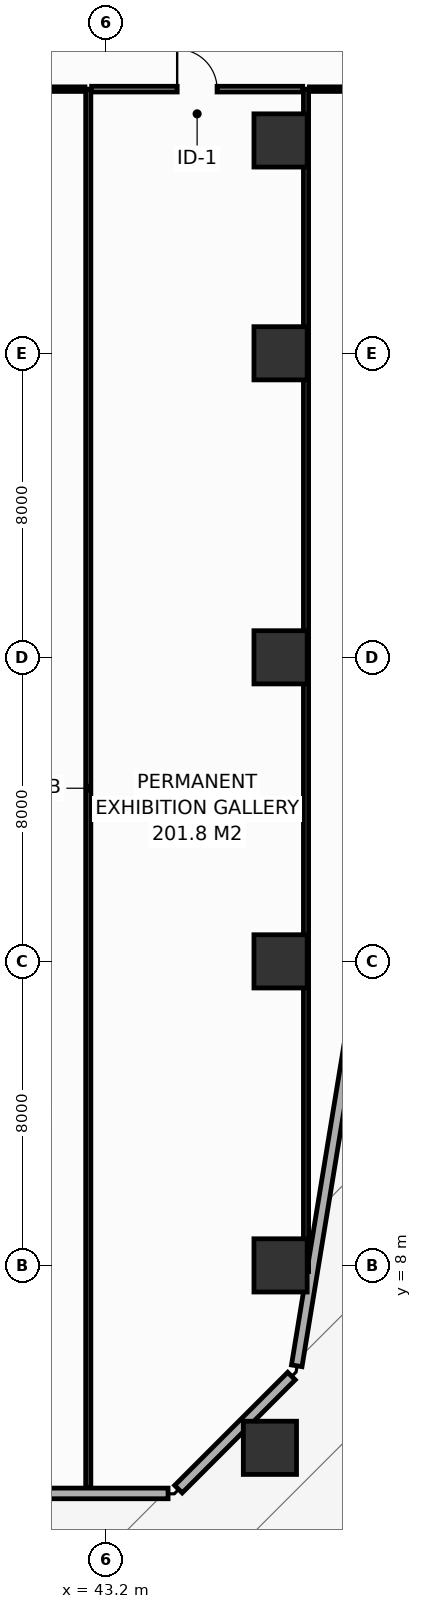
"""IFC4 building model, lengths in metres.
Left out: names, types, materials, properties, quantities, classifications, styles, units other than length and angle.
Written with IfcOpenShell. Run it as: python <this file> out.ifc"""

import sys

from ifc_helpers import new_model, si_unit, direction, frame, frame_2d, origin, origin_2d, place, context, subcontext, project, spatial, rectangle, hollow_rectangle, extrude, element, fill, save


model = new_model("IFC4")
c1 = context("Model", 3, precision=1e-05, world=origin(), true_north=direction((0.0, 1.0)))
c2 = subcontext(c1, "Body", "Model", "MODEL_VIEW")
j1 = project(units=[si_unit("LENGTHUNIT", "METRE"), si_unit("PLANEANGLEUNIT", "RADIAN")], contexts=[c1])
p1 = place(None, origin())
s1 = spatial("IfcSite", under=j1, at=p1, CompositionType="ELEMENT")
p2 = place(p1, origin())
s2 = spatial("IfcBuilding", under=s1, at=p2, CompositionType="ELEMENT")
p3 = place(p2, frame((0.0, 0.0, 27.6)))
s3 = spatial("IfcBuildingStorey", under=s2, at=p3, CompositionType="ELEMENT", Elevation=27.6)
for number, where, z_axis, x_axis in (
    (1, (47.52, 3.2, 0.0), (0.0, 0.0, 1.0), (1.0, 0.0, 0.0)),
    (2, (47.8, 8.0, 0.0), (0.0, 0.0, 1.0), (1.0, 0.0, 0.0)),
    (3, (47.8, 16.0, 0.0), (0.0, 0.0, 1.0), (1.0, 0.0, 0.0)),
    (4, (47.8, 24.0, 0.0), (0.0, 0.0, 1.0), (1.0, 0.0, 0.0)),
    (5, (47.8, 32.0, 0.0), (0.0, 0.0, 1.0), (1.0, 0.0, 0.0)),
    (6, (47.8, 37.6, 0.0), (0.0, 0.0, 1.0), (1.0, 0.0, 0.0)),
):
    element("IfcColumn", number, at=place(p3, frame(where, z_axis=z_axis, x_axis=x_axis)), inside=s3, PredefinedType="COLUMN", context=c2, shape_type="SweptSolid", body=[
        extrude(hollow_rectangle(XDim=1.4, YDim=1.4, WallThickness=0.065, at=origin_2d()), origin(), (0.0, 0.0, 1.0), 5.4),
    ])
p4 = place(p3, frame((36.56, 2.0, 0.0), z_axis=(0.0, 0.0, 1.0), x_axis=(1.0, 0.0, 0.0)))
e7 = element("IfcWall", 7, at=p4, inside=s3, PredefinedType="STANDARD", context=c2, shape_type="SweptSolid", body=[
    extrude(rectangle(XDim=8.28, YDim=0.28, at=frame_2d((4.14, 0.0))), origin(), (0.0, 0.0, 1.0), 5.15),
])
p5 = place(p4, frame((3.59, 0.0, 0.0)))
e8 = element("IfcOpeningElement", 8, at=p5, cuts=e7, PredefinedType="OPENING", context=c2, shape_type="SweptSolid", body=[
    extrude(rectangle(XDim=1.1, YDim=2.2, at=frame_2d((0.55, 1.1))), frame((0.0, 0.15, 0.0), z_axis=(0.0, -1.0, 0.0), x_axis=(1.0, 0.0, 0.0)), (0.0, 0.0, 1.0), 0.3),
])
p6 = place(p3, frame((45.113, 2.113, 0.0), z_axis=(0.0, 0.0, 1.0), x_axis=(0.707106781187, 0.707106781187, 0.0)))
e9 = element("IfcWall", 9, at=p6, inside=s3, PredefinedType="STANDARD", context=c2, shape_type="SweptSolid", body=[
    extrude(rectangle(XDim=4.206, YDim=0.28, at=frame_2d((2.103, 0.0))), origin(), (0.0, 0.0, 1.0), 5.15),
])
p7 = place(p3, frame((48.226, 5.358, 0.0), z_axis=(0.0, 0.0, 1.0), x_axis=(0.161709707857, 0.986838370953, 0.0)))
e10 = element("IfcWall", 10, at=p7, inside=s3, PredefinedType="STANDARD", context=c2, shape_type="SweptSolid", body=[
    extrude(rectangle(XDim=47.915, YDim=0.28, at=frame_2d((23.958, 0.0))), origin(), (0.0, 0.0, 1.0), 5.15),
])
p8 = place(p7, frame((23.407, 0.0, 0.0)))
e11 = element("IfcOpeningElement", 11, at=p8, cuts=e10, PredefinedType="OPENING", context=c2, shape_type="SweptSolid", body=[
    extrude(rectangle(XDim=1.1, YDim=2.2, at=frame_2d((0.55, 1.1))), frame((0.0, 0.15, 0.0), z_axis=(0.0, -1.0, 0.0), x_axis=(1.0, 0.0, 0.0)), (0.0, 0.0, 1.0), 0.3),
])
p9 = place(p3, frame((42.74, 2.16, 0.0), z_axis=(0.0, 0.0, 1.0), x_axis=(0.0, 1.0, 0.0)))
e12 = element("IfcWall", 12, at=p9, inside=s3, PredefinedType="PARTITIONING", context=c2, shape_type="SweptSolid", body=[
    extrude(rectangle(XDim=36.79, YDim=0.135, at=frame_2d((18.395, 0.0))), origin(), (0.0, 0.0, 1.0), 4.235),
])
p10 = place(p3, frame((48.47, 7.837, 0.0), z_axis=(0.0, 0.0, 1.0), x_axis=(0.0, 1.0, 0.0)))
e13 = element("IfcWall", 13, at=p10, inside=s3, PredefinedType="PARTITIONING", context=c2, shape_type="SweptSolid", body=[
    extrude(rectangle(XDim=31.113, YDim=0.135, at=frame_2d((15.557, 0.0))), origin(), (0.0, 0.0, 1.0), 4.235),
])
p11 = place(p3, frame((36.15, 38.95, 0.0), z_axis=(0.0, 0.0, 1.0), x_axis=(1.0, 0.0, 0.0)))
e14 = element("IfcWall", 14, at=p11, inside=s3, PredefinedType="PARTITIONING", context=c2, shape_type="SweptSolid", body=[
    extrude(rectangle(XDim=6.503, YDim=0.12, at=frame_2d((3.251, 0.0))), origin(), (0.0, 0.0, 1.0), 4.235),
])
p12 = place(p11, frame((2.801, 0.0, 0.0)))
e15 = element("IfcOpeningElement", 15, at=p12, cuts=e14, PredefinedType="OPENING", context=c2, shape_type="SweptSolid", body=[
    extrude(rectangle(XDim=0.9, YDim=2.1, at=frame_2d((0.45, 1.05))), frame((0.0, 0.07, 0.0), z_axis=(0.0, -1.0, 0.0), x_axis=(1.0, 0.0, 0.0)), (0.0, 0.0, 1.0), 0.14),
])
p13 = place(p3, frame((42.827, 38.95, 0.0), z_axis=(0.0, 0.0, 1.0), x_axis=(1.0, 0.0, 0.0)))
e16 = element("IfcWall", 16, at=p13, inside=s3, PredefinedType="PARTITIONING", context=c2, shape_type="SweptSolid", body=[
    extrude(rectangle(XDim=5.555, YDim=0.15, at=frame_2d((2.778, 0.0))), origin(), (0.0, 0.0, 1.0), 5.15),
])
p14 = place(p13, frame((2.252, 0.0, 0.0)))
e17 = element("IfcOpeningElement", 17, at=p14, cuts=e16, PredefinedType="OPENING", context=c2, shape_type="SweptSolid", body=[
    extrude(rectangle(XDim=1.05, YDim=2.15, at=frame_2d((0.525, 1.075))), frame((0.0, 0.085, 0.0), z_axis=(0.0, -1.0, 0.0), x_axis=(1.0, 0.0, 0.0)), (0.0, 0.0, 1.0), 0.17),
])
p15 = place(p3, frame((48.558, 38.95, 0.0), z_axis=(0.0, 0.0, 1.0), x_axis=(1.0, 0.0, 0.0)))
e18 = element("IfcWall", 18, at=p15, inside=s3, PredefinedType="PARTITIONING", context=c2, shape_type="SweptSolid", body=[
    extrude(rectangle(XDim=5.011, YDim=0.12, at=frame_2d((2.505, 0.0))), origin(), (0.0, 0.0, 1.0), 4.235),
])
p16 = place(p15, frame((2.055, 0.0, 0.0)))
e19 = element("IfcOpeningElement", 19, at=p16, cuts=e18, PredefinedType="OPENING", context=c2, shape_type="SweptSolid", body=[
    extrude(rectangle(XDim=0.9, YDim=2.1, at=frame_2d((0.45, 1.05))), frame((0.0, 0.07, 0.0), z_axis=(0.0, -1.0, 0.0), x_axis=(1.0, 0.0, 0.0)), (0.0, 0.0, 1.0), 0.14),
])
p17 = place(p14, origin())
e20 = element("IfcDoor", 20, at=p17, inside=s3, OperationType="SINGLE_SWING_LEFT", PredefinedType="DOOR", context=c2, shape_type="SweptSolid", body=[
    extrude(rectangle(XDim=1.05, YDim=2.15, at=frame_2d((0.525, 1.075))), frame((0.0, 0.025, 0.0), z_axis=(0.0, -1.0, 0.0), x_axis=(1.0, 0.0, 0.0)), (0.0, 0.0, 1.0), 0.05),
])
fill(e17, e20)
save(model, sys.argv[1])
